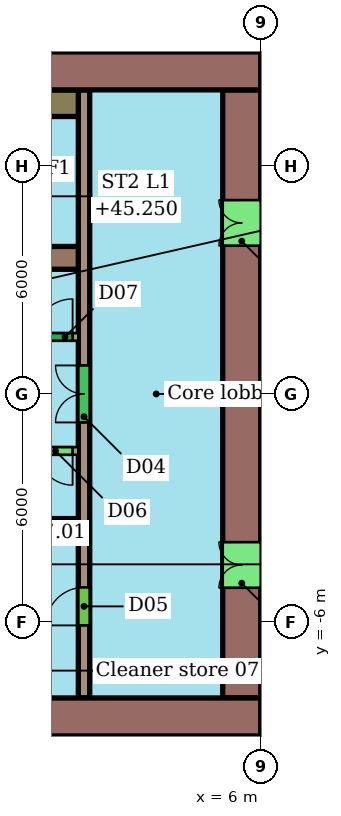
"""IFC4 building model, lengths in metres.
Left out: names, types, materials, properties, quantities, classifications, styles, units other than length and angle.
Written with IfcOpenShell. Run it as: python <this file> out.ifc"""

import sys

from ifc_helpers import new_model, si_unit, direction, frame, frame_2d, origin, place, context, subcontext, project, spatial, rectangle, extrude, element, fill, save


model = new_model("IFC4")
c1 = context("Model", 3, precision=1e-05, world=origin(), true_north=direction((0.0, 1.0)))
c2 = subcontext(c1, "Body", "Model", "MODEL_VIEW")
j1 = project(units=[si_unit("LENGTHUNIT", "METRE"), si_unit("PLANEANGLEUNIT", "RADIAN")], contexts=[c1])
p1 = place(None, origin())
s1 = spatial("IfcSite", under=j1, at=p1, CompositionType="ELEMENT")
p2 = place(p1, origin())
s2 = spatial("IfcBuilding", under=s1, at=p2, CompositionType="ELEMENT")
p3 = place(p2, frame((0.0, 0.0, 43.4)))
s3 = spatial("IfcBuildingStorey", under=s2, at=p3, CompositionType="ELEMENT", Elevation=43.4)
p4 = place(p3, frame((6.0, 8.5, 0.0), z_axis=(0.0, 0.0, 1.0), x_axis=(-1.0, 0.0, 0.0)))
e1 = element("IfcWall", 1, at=p4, inside=s3, PredefinedType="SHEAR", context=c2, shape_type="SweptSolid", body=[
    extrude(rectangle(XDim=12.0, YDim=1.0, at=frame_2d((6.0, 0.0))), origin(), (0.0, 0.0, 1.0), 3.4),
])
p5 = place(p4, frame((5.6, 0.0, 0.0)))
e2 = element("IfcOpeningElement", 2, at=p5, cuts=e1, PredefinedType="OPENING", context=c2, shape_type="SweptSolid", body=[
    extrude(rectangle(XDim=1.2, YDim=2.1, at=frame_2d((0.6, 1.05))), frame((0.0, 0.51, 0.0), z_axis=(0.0, -1.0, 0.0), x_axis=(1.0, 0.0, 0.0)), (0.0, 0.0, 1.0), 1.02),
])
p6 = place(p3, frame((-18.0, -8.5, 0.0), z_axis=(0.0, 0.0, 1.0), x_axis=(1.0, 0.0, 0.0)))
e3 = element("IfcWall", 3, at=p6, inside=s3, PredefinedType="SHEAR", context=c2, shape_type="SweptSolid", body=[
    extrude(rectangle(XDim=24.0, YDim=1.0, at=frame_2d((12.0, 0.0))), origin(), (0.0, 0.0, 1.0), 3.4),
])
p7 = place(p6, frame((6.0, 0.0, 0.0)))
e4 = element("IfcOpeningElement", 4, at=p7, cuts=e3, PredefinedType="OPENING", context=c2, shape_type="SweptSolid", body=[
    extrude(rectangle(XDim=1.2, YDim=2.1, at=frame_2d((0.6, 1.05))), frame((0.0, 0.51, 0.0), z_axis=(0.0, -1.0, 0.0), x_axis=(1.0, 0.0, 0.0)), (0.0, 0.0, 1.0), 1.02),
])
p8 = place(p3, frame((5.5, -8.0, 0.0), z_axis=(0.0, 0.0, 1.0), x_axis=(0.0, 1.0, 0.0)))
e5 = element("IfcWall", 5, at=p8, inside=s3, PredefinedType="SHEAR", context=c2, shape_type="SweptSolid", body=[
    extrude(rectangle(XDim=16.0, YDim=1.0, at=frame_2d((8.0, 0.0))), origin(), (0.0, 0.0, 1.0), 3.4),
])
p9 = place(p8, frame((2.9, 0.0, 0.0)))
e6 = element("IfcOpeningElement", 6, at=p9, cuts=e5, PredefinedType="OPENING", context=c2, shape_type="SweptSolid", body=[
    extrude(rectangle(XDim=1.2, YDim=2.1, at=frame_2d((0.6, 1.05))), frame((0.0, 0.51, 0.0), z_axis=(0.0, -1.0, 0.0), x_axis=(1.0, 0.0, 0.0)), (0.0, 0.0, 1.0), 1.02),
])
p10 = place(p8, frame((11.9, 0.0, 0.0)))
e7 = element("IfcOpeningElement", 7, at=p10, cuts=e5, PredefinedType="OPENING", context=c2, shape_type="SweptSolid", body=[
    extrude(rectangle(XDim=1.2, YDim=2.1, at=frame_2d((0.6, 1.05))), frame((0.0, 0.51, 0.0), z_axis=(0.0, -1.0, 0.0), x_axis=(1.0, 0.0, 0.0)), (0.0, 0.0, 1.0), 1.02),
])
for number, where, z_axis, x_axis in (
    (8, (-6.0, 3.58, 0.0), (0.0, 0.0, 1.0), (1.0, 0.0, 0.0)),
    (9, (-6.0, -3.58, 0.0), (0.0, 0.0, 1.0), (1.0, 0.0, 0.0)),
):
    element("IfcWall", number, at=place(p3, frame(where, z_axis=z_axis, x_axis=x_axis)), inside=s3, PredefinedType="SHEAR", context=c2, shape_type="SweptSolid", body=[
        extrude(rectangle(XDim=7.2, YDim=0.6, at=frame_2d((3.6, 0.0))), origin(), (0.0, 0.0, 1.0), 3.4),
    ])
p11 = place(p3, frame((1.35, -8.0, 0.0), z_axis=(0.0, 0.0, 1.0), x_axis=(0.0, 1.0, 0.0)))
e10 = element("IfcWall", 10, at=p11, inside=s3, PredefinedType="SHEAR", context=c2, shape_type="SweptSolid", body=[
    extrude(rectangle(XDim=16.0, YDim=0.3, at=frame_2d((8.0, 0.0))), origin(), (0.0, 0.0, 1.0), 3.4),
])
p12 = place(p11, frame((1.91, 0.0, 0.0)))
e11 = element("IfcOpeningElement", 11, at=p12, cuts=e10, PredefinedType="OPENING", context=c2, shape_type="SweptSolid", body=[
    extrude(rectangle(XDim=1.0, YDim=2.1, at=frame_2d((0.5, 1.05))), frame((0.0, 0.16, 0.0), z_axis=(0.0, -1.0, 0.0), x_axis=(1.0, 0.0, 0.0)), (0.0, 0.0, 1.0), 0.32),
])
p13 = place(p11, frame((7.25, 0.0, 0.0)))
e12 = element("IfcOpeningElement", 12, at=p13, cuts=e10, PredefinedType="OPENING", context=c2, shape_type="SweptSolid", body=[
    extrude(rectangle(XDim=1.5, YDim=2.1, at=frame_2d((0.75, 1.05))), frame((0.0, 0.16, 0.0), z_axis=(0.0, -1.0, 0.0), x_axis=(1.0, 0.0, 0.0)), (0.0, 0.0, 1.0), 0.32),
])
p14 = place(p3, frame((-13.2, 1.5, 0.0), z_axis=(0.0, 0.0, 1.0), x_axis=(1.0, 0.0, 0.0)))
e13 = element("IfcWall", 13, at=p14, inside=s3, PredefinedType="SHEAR", context=c2, shape_type="SweptSolid", body=[
    extrude(rectangle(XDim=14.4, YDim=0.2, at=frame_2d((7.2, 0.0))), origin(), (0.0, 0.0, 1.0), 3.4),
])
p15 = place(p14, frame((0.546, 0.0, 0.0)))
e14 = element("IfcOpeningElement", 14, at=p15, cuts=e13, PredefinedType="OPENING", context=c2, shape_type="SweptSolid", body=[
    extrude(rectangle(XDim=1.1, YDim=2.1, at=frame_2d((0.55, 1.05))), frame((0.0, 0.11, 0.0), z_axis=(0.0, -1.0, 0.0), x_axis=(1.0, 0.0, 0.0)), (0.0, 0.0, 1.0), 0.22),
])
p16 = place(p14, frame((2.988, 0.0, 0.0)))
e15 = element("IfcOpeningElement", 15, at=p16, cuts=e13, PredefinedType="OPENING", context=c2, shape_type="SweptSolid", body=[
    extrude(rectangle(XDim=1.1, YDim=2.1, at=frame_2d((0.55, 1.05))), frame((0.0, 0.11, 0.0), z_axis=(0.0, -1.0, 0.0), x_axis=(1.0, 0.0, 0.0)), (0.0, 0.0, 1.0), 0.22),
])
p17 = place(p14, frame((5.429, 0.0, 0.0)))
e16 = element("IfcOpeningElement", 16, at=p17, cuts=e13, PredefinedType="OPENING", context=c2, shape_type="SweptSolid", body=[
    extrude(rectangle(XDim=1.1, YDim=2.1, at=frame_2d((0.55, 1.05))), frame((0.0, 0.11, 0.0), z_axis=(0.0, -1.0, 0.0), x_axis=(1.0, 0.0, 0.0)), (0.0, 0.0, 1.0), 0.22),
])
p18 = place(p14, frame((7.871, 0.0, 0.0)))
e17 = element("IfcOpeningElement", 17, at=p18, cuts=e13, PredefinedType="OPENING", context=c2, shape_type="SweptSolid", body=[
    extrude(rectangle(XDim=1.1, YDim=2.1, at=frame_2d((0.55, 1.05))), frame((0.0, 0.11, 0.0), z_axis=(0.0, -1.0, 0.0), x_axis=(1.0, 0.0, 0.0)), (0.0, 0.0, 1.0), 0.22),
])
p19 = place(p14, frame((11.607, 0.0, 0.0)))
e18 = element("IfcOpeningElement", 18, at=p19, cuts=e13, PredefinedType="OPENING", context=c2, shape_type="SweptSolid", body=[
    extrude(rectangle(XDim=0.9, YDim=2.1, at=frame_2d((0.45, 1.05))), frame((0.0, 0.11, 0.0), z_axis=(0.0, -1.0, 0.0), x_axis=(1.0, 0.0, 0.0)), (0.0, 0.0, 1.0), 0.22),
])
p20 = place(p14, frame((13.25, 0.0, 0.0)))
e19 = element("IfcOpeningElement", 19, at=p20, cuts=e13, PredefinedType="OPENING", context=c2, shape_type="SweptSolid", body=[
    extrude(rectangle(XDim=1.0, YDim=2.1, at=frame_2d((0.5, 1.05))), frame((0.0, 0.11, 0.0), z_axis=(0.0, -1.0, 0.0), x_axis=(1.0, 0.0, 0.0)), (0.0, 0.0, 1.0), 0.22),
])
p21 = place(p3, frame((1.2, -1.5, 0.0), z_axis=(0.0, 0.0, 1.0), x_axis=(-1.0, 0.0, 0.0)))
e20 = element("IfcWall", 20, at=p21, inside=s3, PredefinedType="SHEAR", context=c2, shape_type="SweptSolid", body=[
    extrude(rectangle(XDim=14.4, YDim=0.2, at=frame_2d((7.2, 0.0))), origin(), (0.0, 0.0, 1.0), 3.4),
])
p22 = place(p21, frame((7.821, 0.0, 0.0)))
e21 = element("IfcOpeningElement", 21, at=p22, cuts=e20, PredefinedType="OPENING", context=c2, shape_type="SweptSolid", body=[
    extrude(rectangle(XDim=1.2, YDim=2.1, at=frame_2d((0.6, 1.05))), frame((0.0, 0.11, 0.0), z_axis=(0.0, -1.0, 0.0), x_axis=(1.0, 0.0, 0.0)), (0.0, 0.0, 1.0), 0.22),
])
p23 = place(p21, frame((0.15, 0.0, 0.0)))
e22 = element("IfcOpeningElement", 22, at=p23, cuts=e20, PredefinedType="OPENING", context=c2, shape_type="SweptSolid", body=[
    extrude(rectangle(XDim=0.9, YDim=2.1, at=frame_2d((0.45, 1.05))), frame((0.0, 0.11, 0.0), z_axis=(0.0, -1.0, 0.0), x_axis=(1.0, 0.0, 0.0)), (0.0, 0.0, 1.0), 0.22),
])
p24 = place(p3, frame((0.4, 7.65, 0.0), z_axis=(0.0, 0.0, 1.0), x_axis=(1.0, 0.0, 0.0)))
e23 = element("IfcWall", 23, at=p24, inside=s3, PredefinedType="SHEAR", context=c2, shape_type="SweptSolid", body=[
    extrude(rectangle(XDim=0.8, YDim=0.7, at=frame_2d((0.4, 0.0))), origin(), (0.0, 0.0, 1.0), 3.4),
])
p25 = place(p9, origin())
e24 = element("IfcDoor", 24, at=p25, inside=s3, OperationType="DOUBLE_DOOR_SINGLE_SWING", PredefinedType="NOTDEFINED", context=c2, shape_type="SweptSolid", body=[
    extrude(rectangle(XDim=1.2, YDim=2.1, at=frame_2d((0.6, 1.05))), frame((0.0, 0.025, 0.0), z_axis=(0.0, -1.0, 0.0), x_axis=(1.0, 0.0, 0.0)), (0.0, 0.0, 1.0), 0.05),
])
fill(e6, e24)
p26 = place(p10, origin())
e25 = element("IfcDoor", 25, at=p26, inside=s3, OperationType="DOUBLE_DOOR_SINGLE_SWING", PredefinedType="NOTDEFINED", context=c2, shape_type="SweptSolid", body=[
    extrude(rectangle(XDim=1.2, YDim=2.1, at=frame_2d((0.6, 1.05))), frame((0.0, 0.025, 0.0), z_axis=(0.0, -1.0, 0.0), x_axis=(1.0, 0.0, 0.0)), (0.0, 0.0, 1.0), 0.05),
])
fill(e7, e25)
p27 = place(p12, origin())
e26 = element("IfcDoor", 26, at=p27, inside=s3, OperationType="SINGLE_SWING_LEFT", PredefinedType="NOTDEFINED", context=c2, shape_type="SweptSolid", body=[
    extrude(rectangle(XDim=1.0, YDim=2.1, at=frame_2d((0.5, 1.05))), frame((0.0, 0.025, 0.0), z_axis=(0.0, -1.0, 0.0), x_axis=(1.0, 0.0, 0.0)), (0.0, 0.0, 1.0), 0.05),
])
fill(e11, e26)
p28 = place(p13, origin())
e27 = element("IfcDoor", 27, at=p28, inside=s3, OperationType="DOUBLE_DOOR_SINGLE_SWING", PredefinedType="NOTDEFINED", context=c2, shape_type="SweptSolid", body=[
    extrude(rectangle(XDim=1.5, YDim=2.1, at=frame_2d((0.75, 1.05))), frame((0.0, 0.025, 0.0), z_axis=(0.0, -1.0, 0.0), x_axis=(1.0, 0.0, 0.0)), (0.0, 0.0, 1.0), 0.05),
])
fill(e12, e27)
p29 = place(p20, origin())
e28 = element("IfcDoor", 28, at=p29, inside=s3, OperationType="SINGLE_SWING_RIGHT", PredefinedType="NOTDEFINED", context=c2, shape_type="SweptSolid", body=[
    extrude(rectangle(XDim=1.0, YDim=2.1, at=frame_2d((0.5, 1.05))), frame((0.0, 0.025, 0.0), z_axis=(0.0, -1.0, 0.0), x_axis=(1.0, 0.0, 0.0)), (0.0, 0.0, 1.0), 0.05),
])
fill(e19, e28)
p30 = place(p23, origin())
e29 = element("IfcDoor", 29, at=p30, inside=s3, OperationType="SINGLE_SWING_LEFT", PredefinedType="NOTDEFINED", context=c2, shape_type="SweptSolid", body=[
    extrude(rectangle(XDim=0.9, YDim=2.1, at=frame_2d((0.45, 1.05))), frame((0.0, 0.025, 0.0), z_axis=(0.0, -1.0, 0.0), x_axis=(1.0, 0.0, 0.0)), (0.0, 0.0, 1.0), 0.05),
])
fill(e22, e29)
save(model, sys.argv[1])
